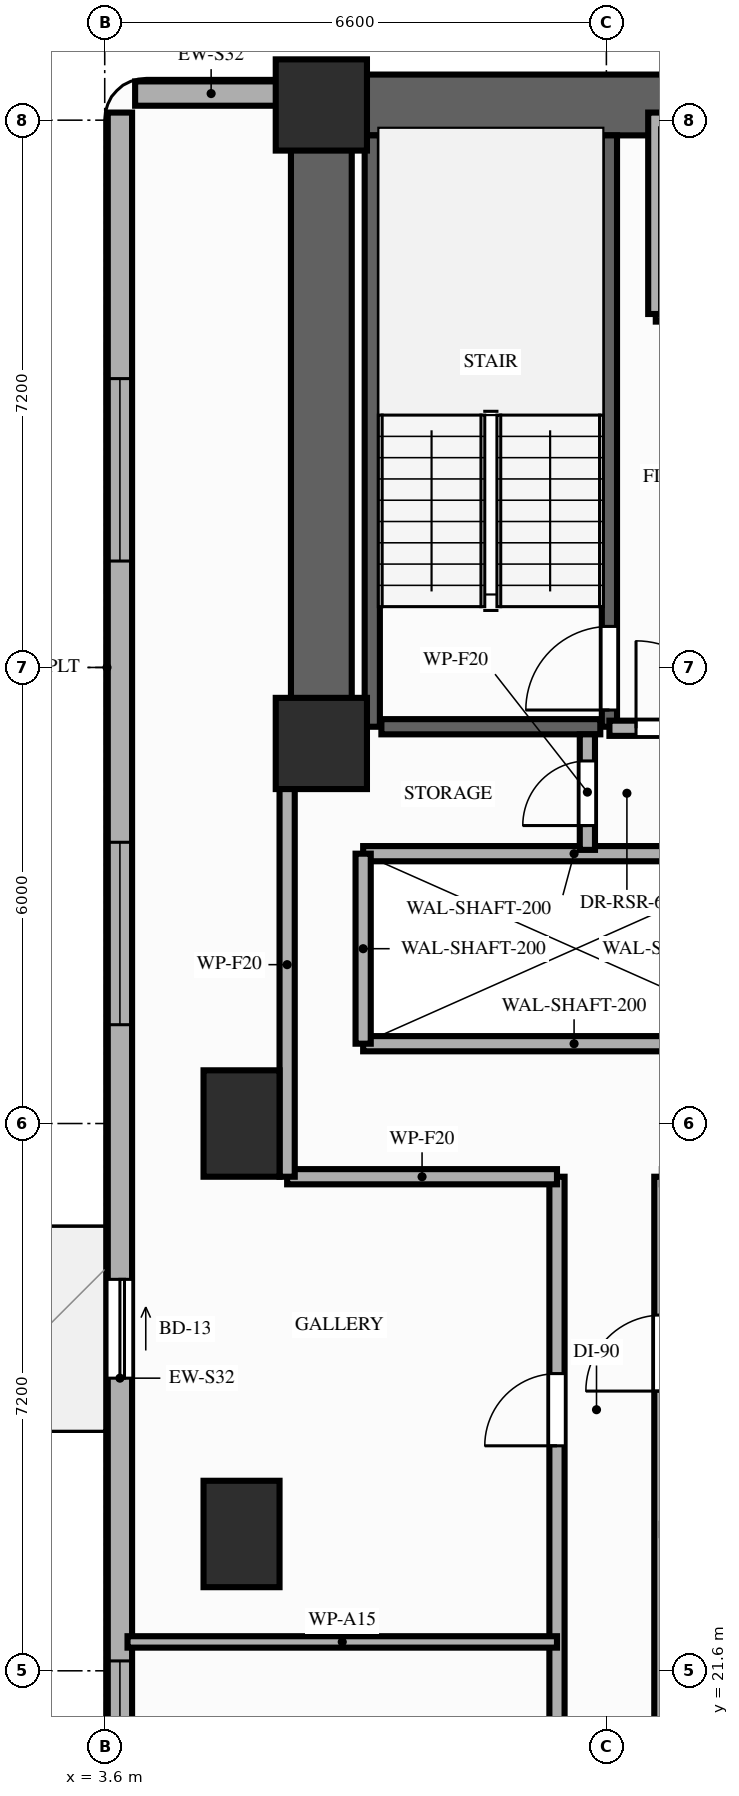
"""IFC4 building model, lengths in metres.
Left out: names, types, materials, properties, quantities, classifications, styles, units other than length and angle.
Written with IfcOpenShell. Run it as: python <this file> out.ifc"""

import sys

from ifc_helpers import new_model, si_unit, direction, frame, frame_2d, origin, origin_2d, place, context, subcontext, project, spatial, rectangle, extrude, element, fill, save


model = new_model("IFC4")
c1 = context("Model", 3, precision=1e-05, world=origin(), true_north=direction((0.0, 1.0)))
c2 = subcontext(c1, "Body", "Model", "MODEL_VIEW")
j1 = project(units=[si_unit("LENGTHUNIT", "METRE"), si_unit("PLANEANGLEUNIT", "RADIAN")], contexts=[c1])
p1 = place(None, origin())
s1 = spatial("IfcSite", under=j1, at=p1, CompositionType="ELEMENT")
p2 = place(p1, origin())
s2 = spatial("IfcBuilding", under=s1, at=p2, CompositionType="ELEMENT")
p3 = place(p2, frame((0.0, 0.0, 36.6)))
s3 = spatial("IfcBuildingStorey", under=s2, at=p3, CompositionType="ELEMENT", Elevation=36.6)
for number, where, z_axis, x_axis in (
    (1, (6.45, 33.8, 0.0), (0.0, 0.0, 1.0), (1.0, 0.0, 0.0)),
    (2, (6.45, 42.2, 0.0), (0.0, 0.0, 1.0), (1.0, 0.0, 0.0)),
):
    element("IfcColumn", number, at=place(p3, frame(where, z_axis=z_axis, x_axis=x_axis)), inside=s3, PredefinedType="COLUMN", context=c2, shape_type="SweptSolid", body=[
        extrude(rectangle(XDim=1.2, YDim=1.2, at=origin_2d()), origin(), (0.0, 0.0, 1.0), 3.2),
    ])
for number, where, z_axis, x_axis in (
    (3, (5.4, 23.4, 0.0), (0.0, 0.0, 1.0), (1.0, 0.0, 0.0)),
    (4, (5.4, 28.8, 0.0), (0.0, 0.0, 1.0), (1.0, 0.0, 0.0)),
):
    element("IfcColumn", number, at=place(p3, frame(where, z_axis=z_axis, x_axis=x_axis)), inside=s3, PredefinedType="COLUMN", context=c2, shape_type="SweptSolid", body=[
        extrude(rectangle(XDim=1.0, YDim=1.4, at=origin_2d()), origin(), (0.0, 0.0, 1.0), 3.2),
    ])
p4 = place(p3, frame((3.8, 42.1, 0.0), z_axis=(0.0, 0.0, 1.0), x_axis=(0.0, -1.0, 0.0)))
e5 = element("IfcWall", 5, at=p4, inside=s3, PredefinedType="STANDARD", context=c2, shape_type="SweptSolid", body=[
    extrude(rectangle(XDim=33.3, YDim=0.32, at=frame_2d((16.65, 0.0))), origin(), (0.0, 0.0, 1.0), 2.67),
])
p5 = place(p4, frame((26.15, 0.0, 0.0)))
e6 = element("IfcOpeningElement", 6, at=p5, cuts=e5, PredefinedType="OPENING", context=c2, shape_type="SweptSolid", body=[
    extrude(rectangle(XDim=1.3, YDim=2.08, at=frame_2d((0.65, 1.04))), frame((0.0, 0.17, 0.0), z_axis=(0.0, -1.0, 0.0), x_axis=(1.0, 0.0, 0.0)), (0.0, 0.0, 1.0), 0.34),
])
p6 = place(p4, frame((15.35, 0.0, 0.0)))
e7 = element("IfcOpeningElement", 7, at=p6, cuts=e5, PredefinedType="OPENING", context=c2, shape_type="SweptSolid", body=[
    extrude(rectangle(XDim=1.3, YDim=2.08, at=frame_2d((0.65, 1.04))), frame((0.0, 0.17, 0.0), z_axis=(0.0, -1.0, 0.0), x_axis=(1.0, 0.0, 0.0)), (0.0, 0.0, 1.0), 0.34),
])
p7 = place(p4, frame((30.5, 0.0, 0.85)))
e8 = element("IfcOpeningElement", 8, at=p7, cuts=e5, PredefinedType="OPENING", context=c2, shape_type="SweptSolid", body=[
    extrude(rectangle(XDim=2.4, YDim=1.57, at=frame_2d((1.2, 0.785))), frame((0.0, 0.17, 0.0), z_axis=(0.0, -1.0, 0.0), x_axis=(1.0, 0.0, 0.0)), (0.0, 0.0, 1.0), 0.34),
])
p8 = place(p4, frame((20.37, 0.0, 0.85)))
e9 = element("IfcOpeningElement", 9, at=p8, cuts=e5, PredefinedType="OPENING", context=c2, shape_type="SweptSolid", body=[
    extrude(rectangle(XDim=2.4, YDim=1.57, at=frame_2d((1.2, 0.785))), frame((0.0, 0.17, 0.0), z_axis=(0.0, -1.0, 0.0), x_axis=(1.0, 0.0, 0.0)), (0.0, 0.0, 1.0), 0.34),
])
p9 = place(p4, frame((9.6, 0.0, 0.85)))
e10 = element("IfcOpeningElement", 10, at=p9, cuts=e5, PredefinedType="OPENING", context=c2, shape_type="SweptSolid", body=[
    extrude(rectangle(XDim=2.4, YDim=1.57, at=frame_2d((1.2, 0.785))), frame((0.0, 0.17, 0.0), z_axis=(0.0, -1.0, 0.0), x_axis=(1.0, 0.0, 0.0)), (0.0, 0.0, 1.0), 0.34),
])
p10 = place(p4, frame((3.5, 0.0, 0.85)))
e11 = element("IfcOpeningElement", 11, at=p10, cuts=e5, PredefinedType="OPENING", context=c2, shape_type="SweptSolid", body=[
    extrude(rectangle(XDim=2.4, YDim=1.57, at=frame_2d((1.2, 0.785))), frame((0.0, 0.17, 0.0), z_axis=(0.0, -1.0, 0.0), x_axis=(1.0, 0.0, 0.0)), (0.0, 0.0, 1.0), 0.34),
])
p11 = place(p3, frame((6.0, 42.35, 0.0), z_axis=(0.0, 0.0, 1.0), x_axis=(-1.0, 0.0, 0.0)))
e12 = element("IfcWall", 12, at=p11, inside=s3, PredefinedType="STANDARD", context=c2, shape_type="SweptSolid", body=[
    extrude(rectangle(XDim=2.0, YDim=0.32, at=frame_2d((1.0, 0.0))), origin(), (0.0, 0.0, 1.0), 2.96),
])
p12 = place(p3, frame((6.45, 42.2, 0.0), z_axis=(0.0, 0.0, 1.0), x_axis=(1.0, 0.0, 0.0)))
e13 = element("IfcWall", 13, at=p12, inside=s3, PredefinedType="SHEAR", context=c2, shape_type="SweptSolid", body=[
    extrude(rectangle(XDim=20.45, YDim=0.8, at=frame_2d((10.225, 0.0))), origin(), (0.0, 0.0, 1.0), 2.96),
])
p13 = place(p3, frame((6.45, 33.8, 0.0), z_axis=(0.0, 0.0, 1.0), x_axis=(0.0, 1.0, 0.0)))
e14 = element("IfcWall", 14, at=p13, inside=s3, PredefinedType="SHEAR", context=c2, shape_type="SweptSolid", body=[
    extrude(rectangle(XDim=7.95, YDim=0.8, at=frame_2d((3.975, 0.0))), origin(), (0.0, 0.0, 1.0), 2.96),
])
p14 = place(p3, frame((7.12, 34.02, 0.0), z_axis=(0.0, 0.0, 1.0), x_axis=(0.0, 1.0, 0.0)))
e15 = element("IfcWall", 15, at=p14, inside=s3, PredefinedType="SHEAR", context=c2, shape_type="SweptSolid", body=[
    extrude(rectangle(XDim=7.78, YDim=0.2, at=frame_2d((3.89, 0.0))), origin(), (0.0, 0.0, 1.0), 2.96),
])
p15 = place(p3, frame((10.24, 34.02, 0.0), z_axis=(0.0, 0.0, 1.0), x_axis=(0.0, 1.0, 0.0)))
e16 = element("IfcWall", 16, at=p15, inside=s3, PredefinedType="SHEAR", context=c2, shape_type="SweptSolid", body=[
    extrude(rectangle(XDim=7.78, YDim=0.2, at=frame_2d((3.89, 0.0))), origin(), (0.0, 0.0, 1.0), 2.96),
])
p16 = place(p15, frame((0.22, 0.0, 0.0)))
e17 = element("IfcOpeningElement", 17, at=p16, cuts=e16, PredefinedType="OPENING", context=c2, shape_type="SweptSolid", body=[
    extrude(rectangle(XDim=1.1, YDim=2.15, at=frame_2d((0.55, 1.075))), frame((0.0, 0.11, 0.0), z_axis=(0.0, -1.0, 0.0), x_axis=(1.0, 0.0, 0.0)), (0.0, 0.0, 1.0), 0.22),
])
p17 = place(p3, frame((7.24, 34.02, 0.0), z_axis=(0.0, 0.0, 1.0), x_axis=(1.0, 0.0, 0.0)))
e18 = element("IfcWall", 18, at=p17, inside=s3, PredefinedType="SHEAR", context=c2, shape_type="SweptSolid", body=[
    extrude(rectangle(XDim=2.88, YDim=0.2, at=frame_2d((1.44, 0.0))), origin(), (0.0, 0.0, 1.0), 2.96),
])
for number, where, z_axis, x_axis in (
    (19, (7.0, 29.85, 0.0), (0.0, 0.0, 1.0), (1.0, 0.0, 0.0)),
    (20, (7.0, 32.35, 0.0), (0.0, 0.0, 1.0), (1.0, 0.0, 0.0)),
):
    element("IfcWall", number, at=place(p3, frame(where, z_axis=z_axis, x_axis=x_axis)), inside=s3, PredefinedType="MOVABLE", context=c2, shape_type="SweptSolid", body=[
        extrude(rectangle(XDim=5.55, YDim=0.2, at=frame_2d((2.775, 0.0))), origin(), (0.0, 0.0, 1.0), 2.96),
    ])
p18 = place(p3, frame((7.0, 29.85, 0.0), z_axis=(0.0, 0.0, 1.0), x_axis=(0.0, 1.0, 0.0)))
e21 = element("IfcWall", 21, at=p18, inside=s3, PredefinedType="MOVABLE", context=c2, shape_type="SweptSolid", body=[
    extrude(rectangle(XDim=2.5, YDim=0.2, at=frame_2d((1.25, 0.0))), origin(), (0.0, 0.0, 1.0), 2.96),
])
p19 = place(p3, frame((10.85, 39.45, 0.0), z_axis=(0.0, 0.0, 1.0), x_axis=(1.0, 0.0, 0.0)))
e22 = element("IfcWall", 22, at=p19, inside=s3, PredefinedType="MOVABLE", context=c2, shape_type="SweptSolid", body=[
    extrude(rectangle(XDim=1.7, YDim=0.2, at=frame_2d((0.85, 0.0))), origin(), (0.0, 0.0, 1.0), 2.96),
])
p20 = place(p19, frame((0.32, 0.0, 0.0)))
e23 = element("IfcOpeningElement", 23, at=p20, cuts=e22, PredefinedType="OPENING", context=c2, shape_type="SweptSolid", body=[
    extrude(rectangle(XDim=1.05, YDim=2.15, at=frame_2d((0.525, 1.075))), frame((0.0, 0.11, 0.0), z_axis=(0.0, -1.0, 0.0), x_axis=(1.0, 0.0, 0.0)), (0.0, 0.0, 1.0), 0.22),
])
p21 = place(p3, frame((10.85, 39.45, 0.0), z_axis=(0.0, 0.0, 1.0), x_axis=(0.0, 1.0, 0.0)))
e24 = element("IfcWall", 24, at=p21, inside=s3, PredefinedType="MOVABLE", context=c2, shape_type="SweptSolid", body=[
    extrude(rectangle(XDim=2.65, YDim=0.2, at=frame_2d((1.325, 0.0))), origin(), (0.0, 0.0, 1.0), 2.35),
])
p22 = place(p3, frame((10.24, 34.0, 0.0), z_axis=(0.0, 0.0, 1.0), x_axis=(1.0, 0.0, 0.0)))
e25 = element("IfcWall", 25, at=p22, inside=s3, PredefinedType="PARTITIONING", context=c2, shape_type="SweptSolid", body=[
    extrude(rectangle(XDim=2.66, YDim=0.2, at=frame_2d((1.33, 0.0))), origin(), (0.0, 0.0, 1.0), 2.35),
])
p23 = place(p22, frame((0.35, 0.0, 0.0)))
e26 = element("IfcOpeningElement", 26, at=p23, cuts=e25, PredefinedType="OPENING", context=c2, shape_type="SweptSolid", body=[
    extrude(rectangle(XDim=1.15, YDim=2.15, at=frame_2d((0.575, 1.075))), frame((0.0, 0.11, 0.0), z_axis=(0.0, -1.0, 0.0), x_axis=(1.0, 0.0, 0.0)), (0.0, 0.0, 1.0), 0.22),
])
p24 = place(p3, frame((9.95, 32.4, 0.0), z_axis=(0.0, 0.0, 1.0), x_axis=(0.0, 1.0, 0.0)))
e27 = element("IfcWall", 27, at=p24, inside=s3, PredefinedType="PARTITIONING", context=c2, shape_type="SweptSolid", body=[
    extrude(rectangle(XDim=1.52, YDim=0.2, at=frame_2d((0.76, 0.0))), origin(), (0.0, 0.0, 1.0), 2.35),
])
p25 = place(p24, frame((0.32, 0.0, 0.0)))
e28 = element("IfcOpeningElement", 28, at=p25, cuts=e27, PredefinedType="OPENING", context=c2, shape_type="SweptSolid", body=[
    extrude(rectangle(XDim=0.85, YDim=2.05, at=frame_2d((0.425, 1.025))), frame((0.0, 0.11, 0.0), z_axis=(0.0, -1.0, 0.0), x_axis=(1.0, 0.0, 0.0)), (0.0, 0.0, 1.0), 0.22),
])
p26 = place(p3, frame((9.55, 12.4, 0.0), z_axis=(0.0, 0.0, 1.0), x_axis=(0.0, 1.0, 0.0)))
e29 = element("IfcWall", 29, at=p26, inside=s3, PredefinedType="PARTITIONING", context=c2, shape_type="SweptSolid", body=[
    extrude(rectangle(XDim=15.7, YDim=0.2, at=frame_2d((7.85, 0.0))), origin(), (0.0, 0.0, 1.0), 2.35),
])
p27 = place(p26, frame((1.64, 0.0, 0.0)))
e30 = element("IfcOpeningElement", 30, at=p27, cuts=e29, PredefinedType="OPENING", context=c2, shape_type="SweptSolid", body=[
    extrude(rectangle(XDim=0.95, YDim=2.15, at=frame_2d((0.475, 1.075))), frame((0.0, 0.11, 0.0), z_axis=(0.0, -1.0, 0.0), x_axis=(1.0, 0.0, 0.0)), (0.0, 0.0, 1.0), 0.22),
])
p28 = place(p26, frame((6.43, 0.0, 0.0)))
e31 = element("IfcOpeningElement", 31, at=p28, cuts=e29, PredefinedType="OPENING", context=c2, shape_type="SweptSolid", body=[
    extrude(rectangle(XDim=0.95, YDim=2.15, at=frame_2d((0.475, 1.075))), frame((0.0, 0.11, 0.0), z_axis=(0.0, -1.0, 0.0), x_axis=(1.0, 0.0, 0.0)), (0.0, 0.0, 1.0), 0.22),
])
p29 = place(p26, frame((12.16, 0.0, 0.0)))
e32 = element("IfcOpeningElement", 32, at=p29, cuts=e29, PredefinedType="OPENING", context=c2, shape_type="SweptSolid", body=[
    extrude(rectangle(XDim=0.95, YDim=2.15, at=frame_2d((0.475, 1.075))), frame((0.0, 0.11, 0.0), z_axis=(0.0, -1.0, 0.0), x_axis=(1.0, 0.0, 0.0)), (0.0, 0.0, 1.0), 0.22),
])
p30 = place(p3, frame((10.93, 12.4, 0.0), z_axis=(0.0, 0.0, 1.0), x_axis=(0.0, 1.0, 0.0)))
e33 = element("IfcWall", 33, at=p30, inside=s3, PredefinedType="PARTITIONING", context=c2, shape_type="SweptSolid", body=[
    extrude(rectangle(XDim=15.7, YDim=0.2, at=frame_2d((7.85, 0.0))), origin(), (0.0, 0.0, 1.0), 2.35),
])
p31 = place(p30, frame((0.45, 0.0, 0.0)))
e34 = element("IfcOpeningElement", 34, at=p31, cuts=e33, PredefinedType="OPENING", context=c2, shape_type="SweptSolid", body=[
    extrude(rectangle(XDim=0.85, YDim=2.1, at=frame_2d((0.425, 1.05))), frame((0.0, 0.11, 0.0), z_axis=(0.0, -1.0, 0.0), x_axis=(1.0, 0.0, 0.0)), (0.0, 0.0, 1.0), 0.22),
])
p32 = place(p30, frame((1.89, 0.0, 0.0)))
e35 = element("IfcOpeningElement", 35, at=p32, cuts=e33, PredefinedType="OPENING", context=c2, shape_type="SweptSolid", body=[
    extrude(rectangle(XDim=0.95, YDim=2.1, at=frame_2d((0.475, 1.05))), frame((0.0, 0.11, 0.0), z_axis=(0.0, -1.0, 0.0), x_axis=(1.0, 0.0, 0.0)), (0.0, 0.0, 1.0), 0.22),
])
p33 = place(p30, frame((6.61, 0.0, 0.0)))
e36 = element("IfcOpeningElement", 36, at=p33, cuts=e33, PredefinedType="OPENING", context=c2, shape_type="SweptSolid", body=[
    extrude(rectangle(XDim=1.0, YDim=2.15, at=frame_2d((0.5, 1.075))), frame((0.0, 0.11, 0.0), z_axis=(0.0, -1.0, 0.0), x_axis=(1.0, 0.0, 0.0)), (0.0, 0.0, 1.0), 0.22),
])
p34 = place(p30, frame((12.88, 0.0, 0.0)))
e37 = element("IfcOpeningElement", 37, at=p34, cuts=e33, PredefinedType="OPENING", context=c2, shape_type="SweptSolid", body=[
    extrude(rectangle(XDim=1.0, YDim=2.15, at=frame_2d((0.5, 1.075))), frame((0.0, 0.11, 0.0), z_axis=(0.0, -1.0, 0.0), x_axis=(1.0, 0.0, 0.0)), (0.0, 0.0, 1.0), 0.22),
])
p35 = place(p3, frame((6.0, 28.1, 0.0), z_axis=(0.0, 0.0, 1.0), x_axis=(1.0, 0.0, 0.0)))
e38 = element("IfcWall", 38, at=p35, inside=s3, PredefinedType="PARTITIONING", context=c2, shape_type="SweptSolid", body=[
    extrude(rectangle(XDim=3.55, YDim=0.2, at=frame_2d((1.775, 0.0))), origin(), (0.0, 0.0, 1.0), 2.96),
])
p36 = place(p3, frame((6.0, 28.1, 0.0), z_axis=(0.0, 0.0, 1.0), x_axis=(0.0, 1.0, 0.0)))
e39 = element("IfcWall", 39, at=p36, inside=s3, PredefinedType="PARTITIONING", context=c2, shape_type="SweptSolid", body=[
    extrude(rectangle(XDim=5.58, YDim=0.2, at=frame_2d((2.79, 0.0))), origin(), (0.0, 0.0, 1.0), 2.35),
])
p37 = place(p3, frame((3.9, 21.98, 0.0), z_axis=(0.0, 0.0, 1.0), x_axis=(1.0, 0.0, 0.0)))
e40 = element("IfcWall", 40, at=p37, inside=s3, PredefinedType="PARTITIONING", context=c2, shape_type="SweptSolid", body=[
    extrude(rectangle(XDim=5.65, YDim=0.15, at=frame_2d((2.825, 0.0))), origin(), (0.0, 0.0, 1.0), 2.35),
])
p38 = place(p6, origin())
e41 = element("IfcDoor", 41, at=p38, inside=s3, OperationType="SLIDING_TO_LEFT", PredefinedType="DOOR", context=c2, shape_type="SweptSolid", body=[
    extrude(rectangle(XDim=1.3, YDim=2.08, at=frame_2d((0.65, 1.04))), frame((0.0, 0.025, 0.0), z_axis=(0.0, -1.0, 0.0), x_axis=(1.0, 0.0, 0.0)), (0.0, 0.0, 1.0), 0.05),
])
fill(e7, e41)
p39 = place(p8, origin())
e42 = element("IfcWindow", 42, at=p39, inside=s3, PartitioningType="SINGLE_PANEL", PredefinedType="WINDOW", context=c2, shape_type="SweptSolid", body=[
    extrude(rectangle(XDim=2.4, YDim=1.57, at=frame_2d((1.2, 0.785))), frame((0.0, 0.03, 0.0), z_axis=(0.0, -1.0, 0.0), x_axis=(1.0, 0.0, 0.0)), (0.0, 0.0, 1.0), 0.06),
])
fill(e9, e42)
p40 = place(p9, origin())
e43 = element("IfcWindow", 43, at=p40, inside=s3, PartitioningType="SINGLE_PANEL", PredefinedType="WINDOW", context=c2, shape_type="SweptSolid", body=[
    extrude(rectangle(XDim=2.4, YDim=1.57, at=frame_2d((1.2, 0.785))), frame((0.0, 0.03, 0.0), z_axis=(0.0, -1.0, 0.0), x_axis=(1.0, 0.0, 0.0)), (0.0, 0.0, 1.0), 0.06),
])
fill(e10, e43)
p41 = place(p10, origin())
e44 = element("IfcWindow", 44, at=p41, inside=s3, PartitioningType="SINGLE_PANEL", PredefinedType="WINDOW", context=c2, shape_type="SweptSolid", body=[
    extrude(rectangle(XDim=2.4, YDim=1.57, at=frame_2d((1.2, 0.785))), frame((0.0, 0.03, 0.0), z_axis=(0.0, -1.0, 0.0), x_axis=(1.0, 0.0, 0.0)), (0.0, 0.0, 1.0), 0.06),
])
fill(e11, e44)
p42 = place(p16, origin())
e45 = element("IfcDoor", 45, at=p42, inside=s3, OperationType="SINGLE_SWING_LEFT", PredefinedType="DOOR", context=c2, shape_type="SweptSolid", body=[
    extrude(rectangle(XDim=1.1, YDim=2.15, at=frame_2d((0.55, 1.075))), frame((0.0, 0.025, 0.0), z_axis=(0.0, -1.0, 0.0), x_axis=(1.0, 0.0, 0.0)), (0.0, 0.0, 1.0), 0.05),
])
fill(e17, e45)
p43 = place(p23, origin())
e46 = element("IfcDoor", 46, at=p43, inside=s3, OperationType="SINGLE_SWING_LEFT", PredefinedType="DOOR", context=c2, shape_type="SweptSolid", body=[
    extrude(rectangle(XDim=1.15, YDim=2.15, at=frame_2d((0.575, 1.075))), frame((0.0, 0.025, 0.0), z_axis=(0.0, -1.0, 0.0), x_axis=(1.0, 0.0, 0.0)), (0.0, 0.0, 1.0), 0.05),
])
fill(e26, e46)
p44 = place(p25, origin())
e47 = element("IfcDoor", 47, at=p44, inside=s3, OperationType="SINGLE_SWING_LEFT", PredefinedType="DOOR", context=c2, shape_type="SweptSolid", body=[
    extrude(rectangle(XDim=0.85, YDim=2.05, at=frame_2d((0.425, 1.025))), frame((0.0, 0.025, 0.0), z_axis=(0.0, -1.0, 0.0), x_axis=(1.0, 0.0, 0.0)), (0.0, 0.0, 1.0), 0.05),
])
fill(e28, e47)
p45 = place(p29, origin())
e48 = element("IfcDoor", 48, at=p45, inside=s3, OperationType="SINGLE_SWING_LEFT", PredefinedType="DOOR", context=c2, shape_type="SweptSolid", body=[
    extrude(rectangle(XDim=0.95, YDim=2.15, at=frame_2d((0.475, 1.075))), frame((0.0, 0.025, 0.0), z_axis=(0.0, -1.0, 0.0), x_axis=(1.0, 0.0, 0.0)), (0.0, 0.0, 1.0), 0.05),
])
fill(e32, e48)
save(model, sys.argv[1])
